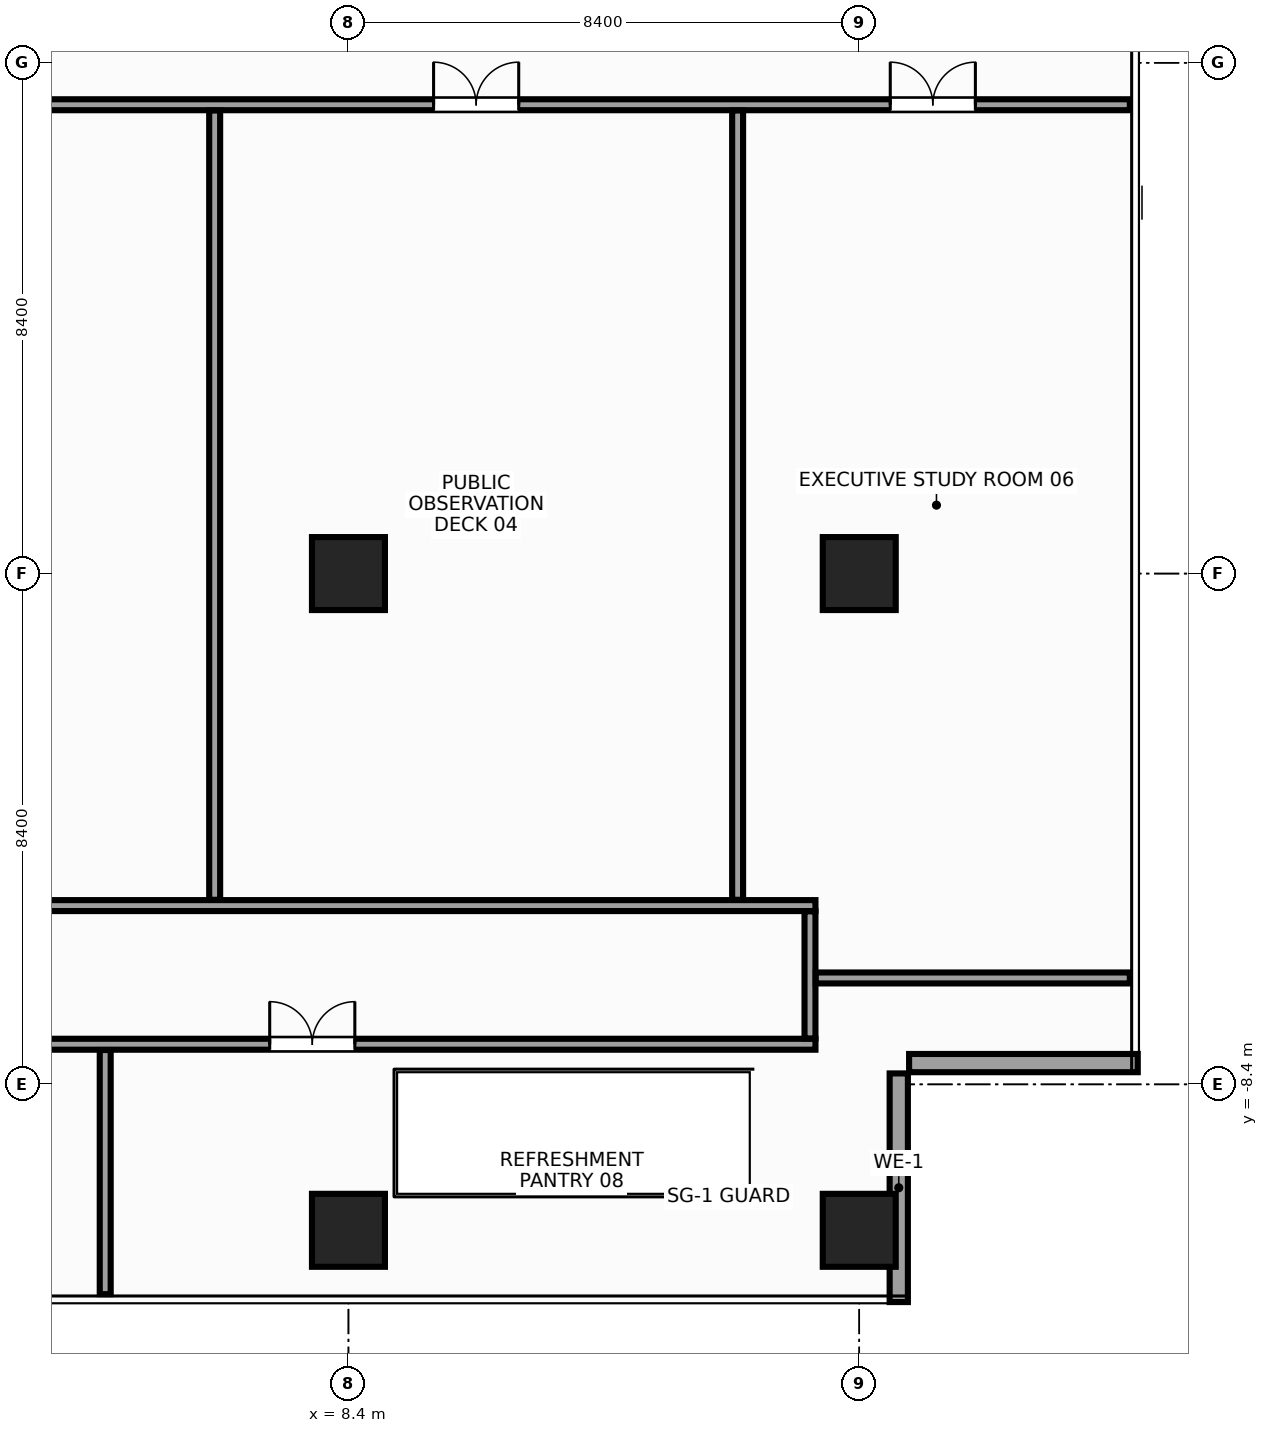
"""IFC4 building model, lengths in metres.
Left out: names, types, materials, properties, quantities, classifications, styles, units other than length and angle.
Written with IfcOpenShell. Run it as: python <this file> out.ifc"""

import sys

from ifc_helpers import new_model, si_unit, direction, frame, frame_2d, origin, origin_2d, place, context, subcontext, project, spatial, rectangle, extrude, source, transform, mapped, element, fill, save


model = new_model("IFC4")
c1 = context("Model", 3, precision=1e-05, world=origin(), true_north=direction((0.0, 1.0)))
c2 = subcontext(c1, "Body", "Model", "MODEL_VIEW")
j1 = project(units=[si_unit("LENGTHUNIT", "METRE"), si_unit("PLANEANGLEUNIT", "RADIAN")], contexts=[c1])
p1 = place(None, origin())
s1 = spatial("IfcSite", under=j1, at=p1, CompositionType="ELEMENT")
p2 = place(p1, origin())
s2 = spatial("IfcBuilding", under=s1, at=p2, CompositionType="ELEMENT")
p3 = place(p2, frame((0.0, 0.0, 290.0)))
s3 = spatial("IfcBuildingStorey", under=s2, at=p3, CompositionType="ELEMENT", Elevation=290.0)
m1 = source(origin(), c2, "Body", "SweptSolid", [
    extrude(rectangle(XDim=1.2, YDim=1.2, at=origin_2d()), origin(), (0.0, 0.0, 1.0), 3.6),
])
for number, where, z_axis, x_axis in (
    (1, (16.8, -10.8, 0.0), (0.0, 0.0, 1.0), (1.0, 0.0, 0.0)),
    (2, (16.8, 0.0, 0.0), (0.0, 0.0, 1.0), (1.0, 0.0, 0.0)),
    (3, (8.4, 0.0, 0.0), (0.0, 0.0, 1.0), (1.0, 0.0, 0.0)),
    (4, (8.4, -10.8, 0.0), (0.0, 0.0, 1.0), (1.0, 0.0, 0.0)),
):
    element("IfcColumn", number, at=place(p3, frame(where, z_axis=z_axis, x_axis=x_axis)), inside=s3, PredefinedType="COLUMN", context=c2, shape_type="MappedRepresentation", body=[
        mapped(m1, transform((0.0, 0.0, 0.0), x_axis=(1.0, 0.0, 0.0), y_axis=(0.0, 1.0, 0.0), z_axis=(0.0, 0.0, 1.0), scale=1.0)),
    ])
m2 = source(origin(), c2, "Body", "SweptSolid", [
    extrude(rectangle(XDim=3.76, YDim=0.3, at=frame_2d((1.88, 0.0))), origin(), (0.0, 0.0, 1.0), 3.6),
])
p4 = place(p3, frame((17.45, -11.98, 0.0), z_axis=(0.0, 0.0, 1.0), x_axis=(0.0, 1.0, 0.0)))
e5 = element("IfcWall", 5, at=p4, inside=s3, PredefinedType="STANDARD", context=c2, shape_type="MappedRepresentation", body=[
    mapped(m2, transform((0.0, 0.0, 0.0), x_axis=(1.0, 0.0, 0.0), y_axis=(0.0, 1.0, 0.0), z_axis=(0.0, 0.0, 1.0), scale=1.0)),
])
m3 = source(origin(), c2, "Body", "SweptSolid", [
    extrude(rectangle(XDim=3.76, YDim=0.3, at=frame_2d((1.88, 0.0))), origin(), (0.0, 0.0, 1.0), 3.6),
])
p5 = place(p3, frame((17.62, -8.05, 0.0), z_axis=(0.0, 0.0, 1.0), x_axis=(1.0, 0.0, 0.0)))
e6 = element("IfcWall", 6, at=p5, inside=s3, PredefinedType="STANDARD", context=c2, shape_type="MappedRepresentation", body=[
    mapped(m3, transform((0.0, 0.0, 0.0), x_axis=(1.0, 0.0, 0.0), y_axis=(0.0, 1.0, 0.0), z_axis=(0.0, 0.0, 1.0), scale=1.0)),
])
m4 = source(origin(), c2, "Body", "SweptSolid", [
    extrude(rectangle(XDim=23.17, YDim=0.18, at=frame_2d((11.585, 0.0))), origin(), (0.0, 0.0, 1.0), 2.685),
])
p6 = place(p3, frame((-1.92, 7.71, 0.0), z_axis=(0.0, 0.0, 1.0), x_axis=(1.0, 0.0, 0.0)))
e7 = element("IfcWall", 7, at=p6, inside=s3, PredefinedType="PARTITIONING", context=c2, shape_type="MappedRepresentation", body=[
    mapped(m4, transform((0.0, 0.0, 0.0), x_axis=(1.0, 0.0, 0.0), y_axis=(0.0, 1.0, 0.0), z_axis=(0.0, 0.0, 1.0), scale=1.0)),
])
p7 = place(p6, frame((3.375, 0.0, 0.0)))
e8 = element("IfcOpeningElement", 8, at=p7, cuts=e7, PredefinedType="OPENING", context=c2, shape_type="SweptSolid", body=[
    extrude(rectangle(XDim=1.4, YDim=2.2, at=frame_2d((0.7, 1.1))), frame((0.0, 0.102, 0.0), z_axis=(0.0, -1.0, 0.0), x_axis=(1.0, 0.0, 0.0)), (0.0, 0.0, 1.0), 0.204),
])
p8 = place(p6, frame((11.72, 0.0, 0.0)))
e9 = element("IfcOpeningElement", 9, at=p8, cuts=e7, PredefinedType="OPENING", context=c2, shape_type="SweptSolid", body=[
    extrude(rectangle(XDim=1.4, YDim=2.2, at=frame_2d((0.7, 1.1))), frame((0.0, 0.102, 0.0), z_axis=(0.0, -1.0, 0.0), x_axis=(1.0, 0.0, 0.0)), (0.0, 0.0, 1.0), 0.204),
])
p9 = place(p6, frame((19.23, 0.0, 0.0)))
e10 = element("IfcOpeningElement", 10, at=p9, cuts=e7, PredefinedType="OPENING", context=c2, shape_type="SweptSolid", body=[
    extrude(rectangle(XDim=1.4, YDim=2.2, at=frame_2d((0.7, 1.1))), frame((0.0, 0.102, 0.0), z_axis=(0.0, -1.0, 0.0), x_axis=(1.0, 0.0, 0.0)), (0.0, 0.0, 1.0), 0.204),
])
m5 = source(origin(), c2, "Body", "SweptSolid", [
    extrude(rectangle(XDim=18.0, YDim=0.18, at=frame_2d((9.0, 0.0))), origin(), (0.0, 0.0, 1.0), 2.685),
])
p10 = place(p3, frame((-1.92, -5.46, 0.0), z_axis=(0.0, 0.0, 1.0), x_axis=(1.0, 0.0, 0.0)))
e11 = element("IfcWall", 11, at=p10, inside=s3, PredefinedType="PARTITIONING", context=c2, shape_type="MappedRepresentation", body=[
    mapped(m5, transform((0.0, 0.0, 0.0), x_axis=(1.0, 0.0, 0.0), y_axis=(0.0, 1.0, 0.0), z_axis=(0.0, 0.0, 1.0), scale=1.0)),
])
m6 = source(origin(), c2, "Body", "SweptSolid", [
    extrude(rectangle(XDim=32.16, YDim=0.18, at=frame_2d((16.08, 0.0))), origin(), (0.0, 0.0, 1.0), 2.685),
])
p11 = place(p3, frame((-16.08, -7.74, 0.0), z_axis=(0.0, 0.0, 1.0), x_axis=(1.0, 0.0, 0.0)))
e12 = element("IfcWall", 12, at=p11, inside=s3, PredefinedType="PARTITIONING", context=c2, shape_type="MappedRepresentation", body=[
    mapped(m6, transform((0.0, 0.0, 0.0), x_axis=(1.0, 0.0, 0.0), y_axis=(0.0, 1.0, 0.0), z_axis=(0.0, 0.0, 1.0), scale=1.0)),
])
p12 = place(p11, frame((4.315, 0.0, 0.0)))
e13 = element("IfcOpeningElement", 13, at=p12, cuts=e12, PredefinedType="OPENING", context=c2, shape_type="SweptSolid", body=[
    extrude(rectangle(XDim=1.4, YDim=2.2, at=frame_2d((0.7, 1.1))), frame((0.0, 0.102, 0.0), z_axis=(0.0, -1.0, 0.0), x_axis=(1.0, 0.0, 0.0)), (0.0, 0.0, 1.0), 0.204),
])
p13 = place(p11, frame((23.185, 0.0, 0.0)))
e14 = element("IfcOpeningElement", 14, at=p13, cuts=e12, PredefinedType="OPENING", context=c2, shape_type="SweptSolid", body=[
    extrude(rectangle(XDim=1.4, YDim=2.2, at=frame_2d((0.7, 1.1))), frame((0.0, 0.102, 0.0), z_axis=(0.0, -1.0, 0.0), x_axis=(1.0, 0.0, 0.0)), (0.0, 0.0, 1.0), 0.204),
])
p14 = place(p11, frame((14.98, 0.0, 0.0)))
e15 = element("IfcOpeningElement", 15, at=p14, cuts=e12, PredefinedType="OPENING", context=c2, shape_type="SweptSolid", body=[
    extrude(rectangle(XDim=1.4, YDim=2.2, at=frame_2d((0.7, 1.1))), frame((0.0, 0.102, 0.0), z_axis=(0.0, -1.0, 0.0), x_axis=(1.0, 0.0, 0.0)), (0.0, 0.0, 1.0), 0.204),
])
m7 = source(origin(), c2, "Body", "SweptSolid", [
    extrude(rectangle(XDim=2.09, YDim=0.18, at=frame_2d((1.045, 0.0))), origin(), (0.0, 0.0, 1.0), 3.3),
])
p15 = place(p3, frame((15.99, -7.645, 0.0), z_axis=(0.0, 0.0, 1.0), x_axis=(0.0, 1.0, 0.0)))
e16 = element("IfcWall", 16, at=p15, inside=s3, PredefinedType="PARTITIONING", context=c2, shape_type="MappedRepresentation", body=[
    mapped(m7, transform((0.0, 0.0, 0.0), x_axis=(1.0, 0.0, 0.0), y_axis=(0.0, 1.0, 0.0), z_axis=(0.0, 0.0, 1.0), scale=1.0)),
])
m8 = source(origin(), c2, "Body", "SweptSolid", [
    extrude(rectangle(XDim=5.165, YDim=0.18, at=frame_2d((2.583, 0.0))), origin(), (0.0, 0.0, 1.0), 2.685),
])
p16 = place(p3, frame((16.085, -6.65, 0.0), z_axis=(0.0, 0.0, 1.0), x_axis=(1.0, 0.0, 0.0)))
e17 = element("IfcWall", 17, at=p16, inside=s3, PredefinedType="PARTITIONING", context=c2, shape_type="MappedRepresentation", body=[
    mapped(m8, transform((0.0, 0.0, 0.0), x_axis=(1.0, 0.0, 0.0), y_axis=(0.0, 1.0, 0.0), z_axis=(0.0, 0.0, 1.0), scale=1.0)),
])
m9 = source(origin(), c2, "Body", "SweptSolid", [
    extrude(rectangle(XDim=12.98, YDim=0.18, at=frame_2d((6.49, 0.0))), origin(), (0.0, 0.0, 1.0), 2.585),
])
for number, where, z_axis, x_axis in (
    (18, (6.2, -5.365, 0.0), (0.0, 0.0, 1.0), (0.0, 1.0, 0.0)),
    (19, (14.8, -5.365, 0.0), (0.0, 0.0, 1.0), (0.0, 1.0, 0.0)),
):
    element("IfcWall", number, at=place(p3, frame(where, z_axis=z_axis, x_axis=x_axis)), inside=s3, PredefinedType="PARTITIONING", context=c2, shape_type="MappedRepresentation", body=[
        mapped(m9, transform((0.0, 0.0, 0.0), x_axis=(1.0, 0.0, 0.0), y_axis=(0.0, 1.0, 0.0), z_axis=(0.0, 0.0, 1.0), scale=1.0)),
    ])
m10 = source(origin(), c2, "Body", "SweptSolid", [
    extrude(rectangle(XDim=4.015, YDim=0.18, at=frame_2d((2.008, 0.0))), origin(), (0.0, 0.0, 1.0), 2.785),
])
p17 = place(p3, frame((4.4, -11.85, 0.0), z_axis=(0.0, 0.0, 1.0), x_axis=(0.0, 1.0, 0.0)))
e20 = element("IfcWall", 20, at=p17, inside=s3, PredefinedType="PARTITIONING", context=c2, shape_type="MappedRepresentation", body=[
    mapped(m10, transform((0.0, 0.0, 0.0), x_axis=(1.0, 0.0, 0.0), y_axis=(0.0, 1.0, 0.0), z_axis=(0.0, 0.0, 1.0), scale=1.0)),
])
m11 = source(origin(), c2, "Body", "SweptSolid", [
    extrude(rectangle(XDim=1.4, YDim=2.2, at=frame_2d((0.7, 1.1))), frame((0.0, 0.025, 0.0), z_axis=(0.0, -1.0, 0.0), x_axis=(1.0, 0.0, 0.0)), (0.0, 0.0, 1.0), 0.05),
])
p18 = place(p8, origin())
e21 = element("IfcDoor", 21, at=p18, inside=s3, OperationType="DOUBLE_DOOR_SINGLE_SWING", PredefinedType="DOOR", context=c2, shape_type="MappedRepresentation", body=[
    mapped(m11, transform((0.0, 0.0, 0.0), x_axis=(1.0, 0.0, 0.0), y_axis=(0.0, 1.0, 0.0), z_axis=(0.0, 0.0, 1.0), scale=1.0)),
])
fill(e9, e21)
p19 = place(p9, origin())
e22 = element("IfcDoor", 22, at=p19, inside=s3, OperationType="DOUBLE_DOOR_SINGLE_SWING", PredefinedType="DOOR", context=c2, shape_type="MappedRepresentation", body=[
    mapped(m11, transform((0.0, 0.0, 0.0), x_axis=(1.0, 0.0, 0.0), y_axis=(0.0, 1.0, 0.0), z_axis=(0.0, 0.0, 1.0), scale=1.0)),
])
fill(e10, e22)
p20 = place(p13, origin())
e23 = element("IfcDoor", 23, at=p20, inside=s3, OperationType="DOUBLE_DOOR_SINGLE_SWING", PredefinedType="DOOR", context=c2, shape_type="MappedRepresentation", body=[
    mapped(m11, transform((0.0, 0.0, 0.0), x_axis=(1.0, 0.0, 0.0), y_axis=(0.0, 1.0, 0.0), z_axis=(0.0, 0.0, 1.0), scale=1.0)),
])
fill(e14, e23)
save(model, sys.argv[1])
